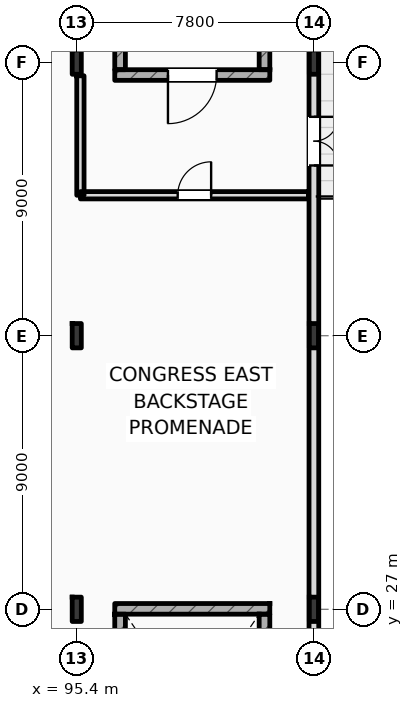
"""IFC4 building model, lengths in metres.
Left out: names, types, materials, properties, quantities, classifications, styles, units other than length and angle.
Written with IfcOpenShell. Run it as: python <this file> out.ifc"""

import sys

from ifc_helpers import new_model, si_unit, direction, frame, frame_2d, origin, origin_2d, place, context, subcontext, project, spatial, rectangle, i_section, extrude, element, fill, save


model = new_model("IFC4")
c1 = context("Model", 3, precision=1e-05, world=origin(), true_north=direction((0.0, 1.0)))
c2 = subcontext(c1, "Body", "Model", "MODEL_VIEW")
j1 = project(units=[si_unit("LENGTHUNIT", "METRE"), si_unit("PLANEANGLEUNIT", "RADIAN")], contexts=[c1])
p1 = place(None, origin())
s1 = spatial("IfcSite", under=j1, at=p1, CompositionType="ELEMENT")
p2 = place(p1, origin())
s2 = spatial("IfcBuilding", under=s1, at=p2, CompositionType="ELEMENT")
p3 = place(p2, origin())
s3 = spatial("IfcBuildingStorey", under=s2, at=p3, CompositionType="ELEMENT", Elevation=0.0)
for number, where, z_axis, x_axis in (
    (1, (95.4, 27.0, 0.0), (0.0, 0.0, 1.0), (1.0, 0.0, 0.0)),
    (2, (95.4, 36.0, 0.0), (0.0, 0.0, 1.0), (1.0, 0.0, 0.0)),
    (3, (95.4, 45.0, 0.0), (0.0, 0.0, 1.0), (1.0, 0.0, 0.0)),
    (4, (103.2, 27.0, 0.0), (0.0, 0.0, 1.0), (1.0, 0.0, 0.0)),
    (5, (103.2, 36.0, 0.0), (0.0, 0.0, 1.0), (1.0, 0.0, 0.0)),
    (6, (103.2, 45.0, 0.0), (0.0, 0.0, 1.0), (1.0, 0.0, 0.0)),
):
    element("IfcColumn", number, at=place(p3, frame(where, z_axis=z_axis, x_axis=x_axis)), inside=s3, PredefinedType="COLUMN", context=c2, shape_type="SweptSolid", body=[
        extrude(i_section(OverallWidth=0.3, OverallDepth=0.8, WebThickness=0.018, FlangeThickness=0.033, FilletRadius=0.03, at=origin_2d()), origin(), (0.0, 0.0, 1.0), 6.0),
    ])
p4 = place(p3, frame((96.65, 27.015, 0.0), z_axis=(0.0, 0.0, 1.0), x_axis=(1.0, 0.0, 0.0)))
e7 = element("IfcWall", 7, at=p4, inside=s3, PredefinedType="SHEAR", context=c2, shape_type="SweptSolid", body=[
    extrude(rectangle(XDim=5.1, YDim=0.35, at=frame_2d((2.55, 0.0))), origin(), (0.0, 0.0, 1.0), 6.0),
])
for number, where, z_axis, x_axis in (
    (8, (96.825, 18.16, 0.0), (0.0, 0.0, 1.0), (0.0, 1.0, 0.0)),
    (9, (101.575, 18.16, 0.0), (0.0, 0.0, 1.0), (0.0, 1.0, 0.0)),
):
    element("IfcWall", number, at=place(p3, frame(where, z_axis=z_axis, x_axis=x_axis)), inside=s3, PredefinedType="SHEAR", context=c2, shape_type="SweptSolid", body=[
        extrude(rectangle(XDim=8.68, YDim=0.35, at=frame_2d((4.34, 0.0))), origin(), (0.0, 0.0, 1.0), 6.0),
    ])
p5 = place(p3, frame((96.65, 44.575, 0.0), z_axis=(0.0, 0.0, 1.0), x_axis=(1.0, 0.0, 0.0)))
e10 = element("IfcWall", 10, at=p5, inside=s3, PredefinedType="SHEAR", context=c2, shape_type="SweptSolid", body=[
    extrude(rectangle(XDim=5.1, YDim=0.35, at=frame_2d((2.55, 0.0))), origin(), (0.0, 0.0, 1.0), 6.0),
])
p6 = place(p5, frame((1.75, 0.0, 0.0)))
e11 = element("IfcOpeningElement", 11, at=p6, cuts=e10, PredefinedType="OPENING", context=c2, shape_type="SweptSolid", body=[
    extrude(rectangle(XDim=1.6, YDim=2.2, at=frame_2d((0.8, 1.1))), frame((0.0, 0.185, 0.0), z_axis=(0.0, -1.0, 0.0), x_axis=(1.0, 0.0, 0.0)), (0.0, 0.0, 1.0), 0.37),
])
for number, where, z_axis, x_axis in (
    (12, (96.825, 44.75, 0.0), (0.0, 0.0, 1.0), (0.0, 1.0, 0.0)),
    (13, (101.575, 44.75, 0.0), (0.0, 0.0, 1.0), (0.0, 1.0, 0.0)),
):
    element("IfcWall", number, at=place(p3, frame(where, z_axis=z_axis, x_axis=x_axis)), inside=s3, PredefinedType="SHEAR", context=c2, shape_type="SweptSolid", body=[
        extrude(rectangle(XDim=8.68, YDim=0.35, at=frame_2d((4.34, 0.0))), origin(), (0.0, 0.0, 1.0), 6.0),
    ])
p7 = place(p3, frame((103.2, 11.4, 0.0), z_axis=(0.0, 0.0, 1.0), x_axis=(0.0, 1.0, 0.0)))
e14 = element("IfcWall", 14, at=p7, inside=s3, PredefinedType="STANDARD", context=c2, shape_type="SweptSolid", body=[
    extrude(rectangle(XDim=42.55, YDim=0.32, at=frame_2d((21.275, 0.0))), origin(), (0.0, 0.0, 1.0), 5.2),
])
p8 = place(p7, frame((30.2, 0.0, 0.0)))
e15 = element("IfcOpeningElement", 15, at=p8, cuts=e14, PredefinedType="OPENING", context=c2, shape_type="SweptSolid", body=[
    extrude(rectangle(XDim=1.6, YDim=2.3, at=frame_2d((0.8, 1.15))), frame((0.0, 0.17, 0.0), z_axis=(0.0, -1.0, 0.0), x_axis=(1.0, 0.0, 0.0)), (0.0, 0.0, 1.0), 0.34),
])
p9 = place(p3, frame((95.52, 40.62, 0.0), z_axis=(0.0, 0.0, 1.0), x_axis=(1.0, 0.0, 0.0)))
e16 = element("IfcWall", 16, at=p9, inside=s3, PredefinedType="STANDARD", context=c2, shape_type="SweptSolid", body=[
    extrude(rectangle(XDim=7.5, YDim=0.24, at=frame_2d((3.75, 0.0))), origin(), (0.0, 0.0, 1.0), 5.7),
])
p10 = place(p9, frame((3.2, 0.0, 0.0)))
e17 = element("IfcOpeningElement", 17, at=p10, cuts=e16, PredefinedType="OPENING", context=c2, shape_type="SweptSolid", body=[
    extrude(rectangle(XDim=1.1, YDim=2.2, at=frame_2d((0.55, 1.1))), frame((0.0, 0.13, 0.0), z_axis=(0.0, -1.0, 0.0), x_axis=(1.0, 0.0, 0.0)), (0.0, 0.0, 1.0), 0.26),
])
p11 = place(p3, frame((95.52, 40.62, 0.0), z_axis=(0.0, 0.0, 1.0), x_axis=(0.0, 1.0, 0.0)))
e18 = element("IfcWall", 18, at=p11, inside=s3, PredefinedType="STANDARD", context=c2, shape_type="SweptSolid", body=[
    extrude(rectangle(XDim=3.93, YDim=0.24, at=frame_2d((1.965, 0.0))), origin(), (0.0, 0.0, 1.0), 5.2),
])
p12 = place(p8, frame((1.6, 0.0, 0.0), z_axis=(0.0, 0.0, 1.0), x_axis=(-1.0, 0.0, 0.0)))
e19 = element("IfcDoor", 19, at=p12, inside=s3, OperationType="DOUBLE_SWING_LEFT", PredefinedType="DOOR", context=c2, shape_type="SweptSolid", body=[
    extrude(rectangle(XDim=1.6, YDim=2.3, at=frame_2d((0.8, 1.15))), frame((0.0, 0.025, 0.0), z_axis=(0.0, -1.0, 0.0), x_axis=(1.0, 0.0, 0.0)), (0.0, 0.0, 1.0), 0.05),
])
fill(e15, e19)
p13 = place(p6, frame((1.6, 0.0, 0.0), z_axis=(0.0, 0.0, 1.0), x_axis=(-1.0, 0.0, 0.0)))
e20 = element("IfcDoor", 20, at=p13, inside=s3, OperationType="SINGLE_SWING_LEFT", PredefinedType="DOOR", context=c2, shape_type="SweptSolid", body=[
    extrude(rectangle(XDim=1.6, YDim=2.2, at=frame_2d((0.8, 1.1))), frame((0.0, 0.025, 0.0), z_axis=(0.0, -1.0, 0.0), x_axis=(1.0, 0.0, 0.0)), (0.0, 0.0, 1.0), 0.05),
])
fill(e11, e20)
p14 = place(p10, origin())
e21 = element("IfcDoor", 21, at=p14, inside=s3, OperationType="SINGLE_SWING_RIGHT", PredefinedType="DOOR", context=c2, shape_type="SweptSolid", body=[
    extrude(rectangle(XDim=1.1, YDim=2.2, at=frame_2d((0.55, 1.1))), frame((0.0, 0.025, 0.0), z_axis=(0.0, -1.0, 0.0), x_axis=(1.0, 0.0, 0.0)), (0.0, 0.0, 1.0), 0.05),
])
fill(e17, e21)
save(model, sys.argv[1])
